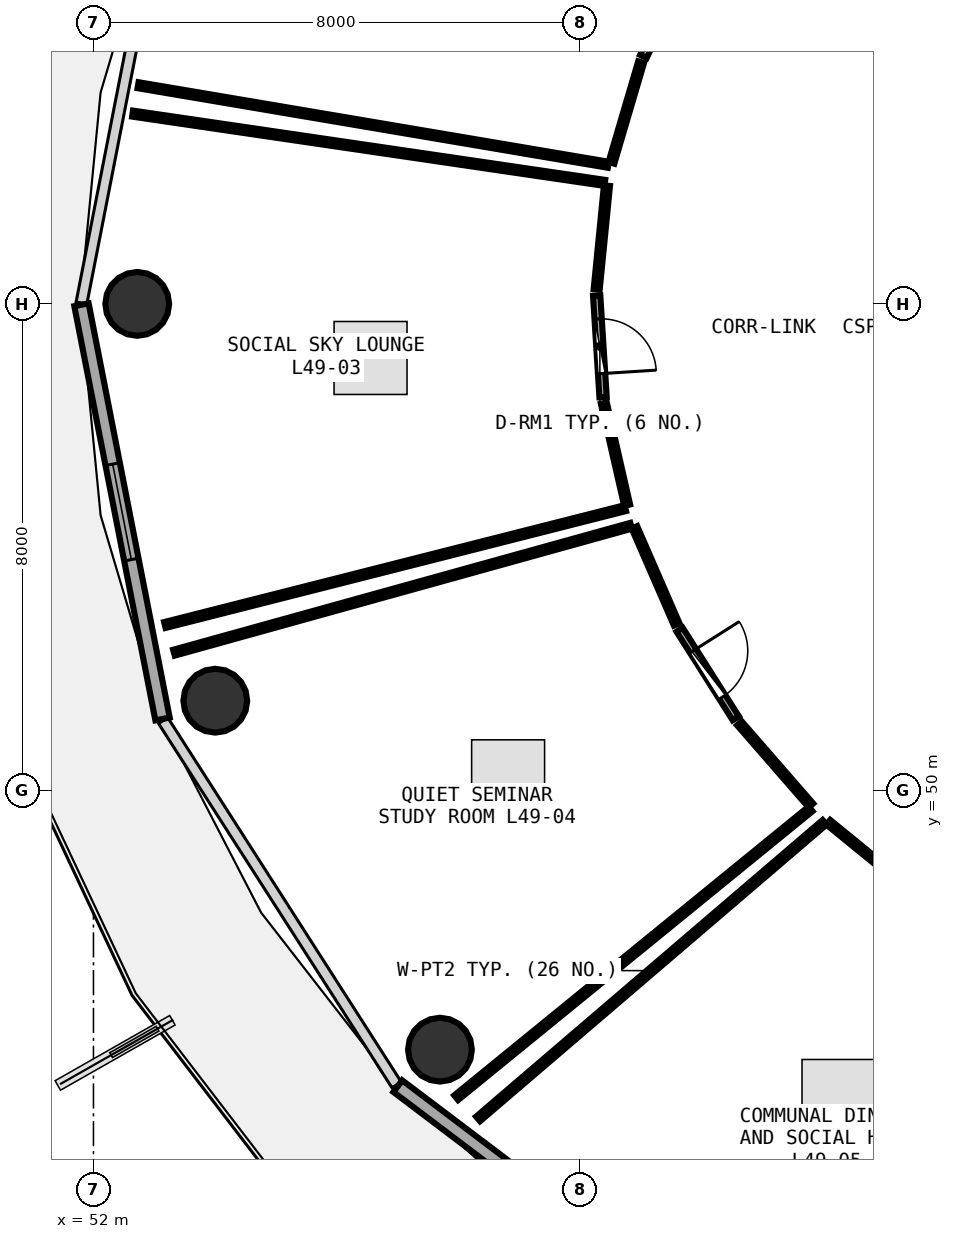
"""IFC4 building model, lengths in metres.
Left out: names, types, materials, properties, quantities, classifications, styles, units other than length and angle.
Written with IfcOpenShell. Run it as: python <this file> out.ifc"""

import sys

from ifc_helpers import new_model, si_unit, direction, frame, frame_2d, origin, origin_2d, place, context, subcontext, project, spatial, rectangle, circle, extrude, element, fill, save


model = new_model("IFC4")
c1 = context("Model", 3, precision=1e-05, world=origin(), true_north=direction((0.0, 1.0)))
c2 = subcontext(c1, "Body", "Model", "MODEL_VIEW")
j1 = project(units=[si_unit("LENGTHUNIT", "METRE"), si_unit("PLANEANGLEUNIT", "RADIAN")], contexts=[c1])
p1 = place(None, origin())
s1 = spatial("IfcSite", under=j1, at=p1, CompositionType="ELEMENT")
p2 = place(p1, origin())
s2 = spatial("IfcBuilding", under=s1, at=p2, CompositionType="ELEMENT")
p3 = place(p2, frame((0.0, 0.0, 193.2)))
s3 = spatial("IfcBuildingStorey", under=s2, at=p3, CompositionType="ELEMENT", Elevation=193.2)
for number, where, z_axis, x_axis in (
    (1, (52.72, 58.0, 0.0), (0.0, 0.0, 1.0), (1.0, 0.0, 0.0)),
    (2, (54.003, 51.474, 0.0), (0.0, 0.0, 1.0), (1.0, 0.0, 0.0)),
    (3, (57.698, 45.736, 0.0), (0.0, 0.0, 1.0), (1.0, 0.0, 0.0)),
):
    element("IfcColumn", number, at=place(p3, frame(where, z_axis=z_axis, x_axis=x_axis)), inside=s3, PredefinedType="COLUMN", context=c2, shape_type="SweptSolid", body=[
        extrude(circle(Radius=0.525, at=origin_2d()), origin(), (0.0, 0.0, 1.0), 3.75),
    ])
p4 = place(p3, frame((51.803, 57.985, 0.0), z_axis=(0.0, 0.0, 1.0), x_axis=(0.192069055673, -0.981381413036, 0.0)))
e4 = element("IfcWall", 4, at=p4, inside=s3, PredefinedType="SOLIDWALL", context=c2, shape_type="SweptSolid", body=[
    extrude(rectangle(XDim=6.94, YDim=0.24, at=frame_2d((3.47, 0.0))), origin(), (0.0, 0.0, 1.0), 3.475),
])
p5 = place(p4, frame((2.67, 0.0, 0.85)))
e5 = element("IfcOpeningElement", 5, at=p5, cuts=e4, PredefinedType="OPENING", context=c2, shape_type="SweptSolid", body=[
    extrude(rectangle(XDim=1.6, YDim=1.45, at=frame_2d((0.8, 0.725))), frame((0.0, 0.13, 0.0), z_axis=(0.0, -1.0, 0.0), x_axis=(1.0, 0.0, 0.0)), (0.0, 0.0, 1.0), 0.26),
])
p6 = place(p3, frame((57.006, 45.135, 0.0), z_axis=(0.0, 0.0, 1.0), x_axis=(0.797701674595, -0.603052268338, 0.0)))
e6 = element("IfcWall", 6, at=p6, inside=s3, PredefinedType="SOLIDWALL", context=c2, shape_type="SweptSolid", body=[
    extrude(rectangle(XDim=7.374, YDim=0.24, at=frame_2d((3.687, 0.0))), origin(), (0.0, 0.0, 1.0), 3.475),
])
p7 = place(p6, frame((2.887, 0.0, 0.85)))
e7 = element("IfcOpeningElement", 7, at=p7, cuts=e6, PredefinedType="OPENING", context=c2, shape_type="SweptSolid", body=[
    extrude(rectangle(XDim=1.6, YDim=1.45, at=frame_2d((0.8, 0.725))), frame((0.0, 0.13, 0.0), z_axis=(0.0, -1.0, 0.0), x_axis=(1.0, 0.0, 0.0)), (0.0, 0.0, 1.0), 0.26),
])
p8 = place(p3, frame((61.778, 63.609, 0.0), z_axis=(0.0, 0.0, 1.0), x_axis=(-0.430372132133, -0.902651553969, 0.0)))
e8 = element("IfcWall", 8, at=p8, inside=s3, PredefinedType="PARTITIONING", context=c2, shape_type="SweptSolid", body=[
    extrude(rectangle(XDim=1.707, YDim=0.12, at=frame_2d((0.854, 0.0))), origin(), (0.0, 0.0, 1.0), 3.235),
])
p9 = place(p8, frame((0.403, 0.0, 0.0)))
e9 = element("IfcOpeningElement", 9, at=p9, cuts=e8, PredefinedType="OPENING", context=c2, shape_type="SweptSolid", body=[
    extrude(rectangle(XDim=0.9, YDim=2.08, at=frame_2d((0.45, 1.04))), frame((0.0, 0.07, 0.0), z_axis=(0.0, -1.0, 0.0), x_axis=(1.0, 0.0, 0.0)), (0.0, 0.0, 1.0), 0.14),
])
p10 = place(p3, frame((60.276, 58.138, 0.0), z_axis=(0.0, 0.0, 1.0), x_axis=(0.062877817732, -0.998021232258, 0.0)))
e10 = element("IfcWall", 10, at=p10, inside=s3, PredefinedType="PARTITIONING", context=c2, shape_type="SweptSolid", body=[
    extrude(rectangle(XDim=1.674, YDim=0.12, at=frame_2d((0.837, 0.0))), origin(), (0.0, 0.0, 1.0), 3.025),
])
p11 = place(p10, frame((0.387, 0.0, 0.0)))
e11 = element("IfcOpeningElement", 11, at=p11, cuts=e10, PredefinedType="OPENING", context=c2, shape_type="SweptSolid", body=[
    extrude(rectangle(XDim=0.9, YDim=2.08, at=frame_2d((0.45, 1.04))), frame((0.0, 0.07, 0.0), z_axis=(0.0, -1.0, 0.0), x_axis=(1.0, 0.0, 0.0)), (0.0, 0.0, 1.0), 0.14),
])
p12 = place(p3, frame((61.64, 52.641, 0.0), z_axis=(0.0, 0.0, 1.0), x_axis=(0.535610965059, -0.844464856645, 0.0)))
e12 = element("IfcWall", 12, at=p12, inside=s3, PredefinedType="PARTITIONING", context=c2, shape_type="SweptSolid", body=[
    extrude(rectangle(XDim=1.725, YDim=0.12, at=frame_2d((0.862, 0.0))), origin(), (0.0, 0.0, 1.0), 3.025),
])
p13 = place(p12, frame((0.412, 0.0, 0.0)))
e13 = element("IfcOpeningElement", 13, at=p13, cuts=e12, PredefinedType="OPENING", context=c2, shape_type="SweptSolid", body=[
    extrude(rectangle(XDim=0.9, YDim=2.08, at=frame_2d((0.45, 1.04))), frame((0.0, 0.07, 0.0), z_axis=(0.0, -1.0, 0.0), x_axis=(1.0, 0.0, 0.0)), (0.0, 0.0, 1.0), 0.14),
])
p14 = place(p3, frame((61.007, 61.976, 0.0), z_axis=(0.0, 0.0, 1.0), x_axis=(-0.282778653399, -0.959185192328, 0.0)))
e14 = element("IfcWall", 14, at=p14, inside=s3, PredefinedType="PARTITIONING", context=c2, shape_type="SweptSolid", body=[
    extrude(rectangle(XDim=1.727, YDim=0.1, at=frame_2d((0.863, 0.0))), origin(), (0.0, 0.0, 1.0), 3.48),
])
p15 = place(p3, frame((60.468, 60.288, 0.0), z_axis=(0.0, 0.0, 1.0), x_axis=(-0.985986320585, 0.166826183855, 0.0)))
e15 = element("IfcWall", 15, at=p15, inside=s3, PredefinedType="PARTITIONING", context=c2, shape_type="SweptSolid", body=[
    extrude(rectangle(XDim=7.844, YDim=0.1, at=frame_2d((3.922, 0.0))), origin(), (0.0, 0.0, 1.0), 3.075),
])
p16 = place(p3, frame((60.445, 59.944, 0.0), z_axis=(0.0, 0.0, 1.0), x_axis=(-0.09867193761, -0.995120017248, 0.0)))
e16 = element("IfcWall", 16, at=p16, inside=s3, PredefinedType="PARTITIONING", context=c2, shape_type="SweptSolid", body=[
    extrude(rectangle(XDim=1.715, YDim=0.1, at=frame_2d((0.857, 0.0))), origin(), (0.0, 0.0, 1.0), 3.48),
])
p17 = place(p3, frame((60.394, 56.369, 0.0), z_axis=(0.0, 0.0, 1.0), x_axis=(0.222570739093, -0.974916543146, 0.0)))
e17 = element("IfcWall", 17, at=p17, inside=s3, PredefinedType="PARTITIONING", context=c2, shape_type="SweptSolid", body=[
    extrude(rectangle(XDim=1.722, YDim=0.1, at=frame_2d((0.861, 0.0))), origin(), (0.0, 0.0, 1.0), 3.48),
])
p18 = place(p3, frame((60.747, 54.641, 0.0), z_axis=(0.0, 0.0, 1.0), x_axis=(-0.969263182074, -0.246026185347, 0.0)))
e18 = element("IfcWall", 18, at=p18, inside=s3, PredefinedType="PARTITIONING", context=c2, shape_type="SweptSolid", body=[
    extrude(rectangle(XDim=7.814, YDim=0.1, at=frame_2d((3.907, 0.0))), origin(), (0.0, 0.0, 1.0), 3.075),
])
p19 = place(p3, frame((52.643, 61.129, 0.0), z_axis=(0.0, 0.0, 1.0), x_axis=(0.989410031557, -0.145147474846, 0.0)))
e19 = element("IfcWall", 19, at=p19, inside=s3, PredefinedType="PARTITIONING", context=c2, shape_type="SweptSolid", body=[
    extrude(rectangle(XDim=7.85, YDim=0.1, at=frame_2d((3.925, 0.0))), origin(), (0.0, 0.0, 1.0), 3.075),
])
p20 = place(p3, frame((60.897, 54.325, 0.0), z_axis=(0.0, 0.0, 1.0), x_axis=(0.399192626392, -0.916867082534, 0.0)))
e20 = element("IfcWall", 20, at=p20, inside=s3, PredefinedType="PARTITIONING", context=c2, shape_type="SweptSolid", body=[
    extrude(rectangle(XDim=1.741, YDim=0.1, at=frame_2d((0.871, 0.0))), origin(), (0.0, 0.0, 1.0), 3.235),
])
p21 = place(p3, frame((62.622, 51.104, 0.0), z_axis=(0.0, 0.0, 1.0), x_axis=(0.656613410786, -0.754227305775, 0.0)))
e21 = element("IfcWall", 21, at=p21, inside=s3, PredefinedType="PARTITIONING", context=c2, shape_type="SweptSolid", body=[
    extrude(rectangle(XDim=1.793, YDim=0.1, at=frame_2d((0.896, 0.0))), origin(), (0.0, 0.0, 1.0), 3.025),
])
p22 = place(p3, frame((63.795, 49.696, 0.0), z_axis=(0.0, 0.0, 1.0), x_axis=(-0.775218498775, -0.631693184353, 0.0)))
e22 = element("IfcWall", 22, at=p22, inside=s3, PredefinedType="PARTITIONING", context=c2, shape_type="SweptSolid", body=[
    extrude(rectangle(XDim=7.52, YDim=0.1, at=frame_2d((3.76, 0.0))), origin(), (0.0, 0.0, 1.0), 3.025),
])
p23 = place(p3, frame((53.323, 52.264, 0.0), z_axis=(0.0, 0.0, 1.0), x_axis=(0.963550174849, 0.267527681834, 0.0)))
e23 = element("IfcWall", 23, at=p23, inside=s3, PredefinedType="PARTITIONING", context=c2, shape_type="SweptSolid", body=[
    extrude(rectangle(XDim=7.803, YDim=0.1, at=frame_2d((3.902, 0.0))), origin(), (0.0, 0.0, 1.0), 3.075),
])
p24 = place(p3, frame((64.085, 49.475, 0.0), z_axis=(0.0, 0.0, 1.0), x_axis=(0.774837468284, -0.632160499986, 0.0)))
e24 = element("IfcWall", 24, at=p24, inside=s3, PredefinedType="PARTITIONING", context=c2, shape_type="SweptSolid", body=[
    extrude(rectangle(XDim=1.827, YDim=0.1, at=frame_2d((0.914, 0.0))), origin(), (0.0, 0.0, 1.0), 3.025),
])
p25 = place(p3, frame((58.325, 44.597, 0.0), z_axis=(0.0, 0.0, 1.0), x_axis=(0.759718239, 0.650252410476, 0.0)))
e25 = element("IfcWall", 25, at=p25, inside=s3, PredefinedType="PARTITIONING", context=c2, shape_type="SweptSolid", body=[
    extrude(rectangle(XDim=7.5, YDim=0.1, at=frame_2d((3.75, 0.0))), origin(), (0.0, 0.0, 1.0), 3.075),
])
p26 = place(p5, origin())
e26 = element("IfcWindow", 26, at=p26, inside=s3, PartitioningType="SINGLE_PANEL", PredefinedType="WINDOW", context=c2, shape_type="SweptSolid", body=[
    extrude(rectangle(XDim=1.6, YDim=1.45, at=frame_2d((0.8, 0.725))), frame((0.0, 0.03, 0.0), z_axis=(0.0, -1.0, 0.0), x_axis=(1.0, 0.0, 0.0)), (0.0, 0.0, 1.0), 0.06),
])
fill(e5, e26)
p27 = place(p11, origin())
e27 = element("IfcDoor", 27, at=p27, inside=s3, OperationType="SINGLE_SWING_RIGHT", PredefinedType="DOOR", context=c2, shape_type="SweptSolid", body=[
    extrude(rectangle(XDim=0.9, YDim=2.08, at=frame_2d((0.45, 1.04))), frame((0.0, 0.025, 0.0), z_axis=(0.0, -1.0, 0.0), x_axis=(1.0, 0.0, 0.0)), (0.0, 0.0, 1.0), 0.05),
])
fill(e11, e27)
p28 = place(p13, origin())
e28 = element("IfcDoor", 28, at=p28, inside=s3, OperationType="SINGLE_SWING_LEFT", PredefinedType="DOOR", context=c2, shape_type="SweptSolid", body=[
    extrude(rectangle(XDim=0.9, YDim=2.08, at=frame_2d((0.45, 1.04))), frame((0.0, 0.025, 0.0), z_axis=(0.0, -1.0, 0.0), x_axis=(1.0, 0.0, 0.0)), (0.0, 0.0, 1.0), 0.05),
])
fill(e13, e28)
save(model, sys.argv[1])
